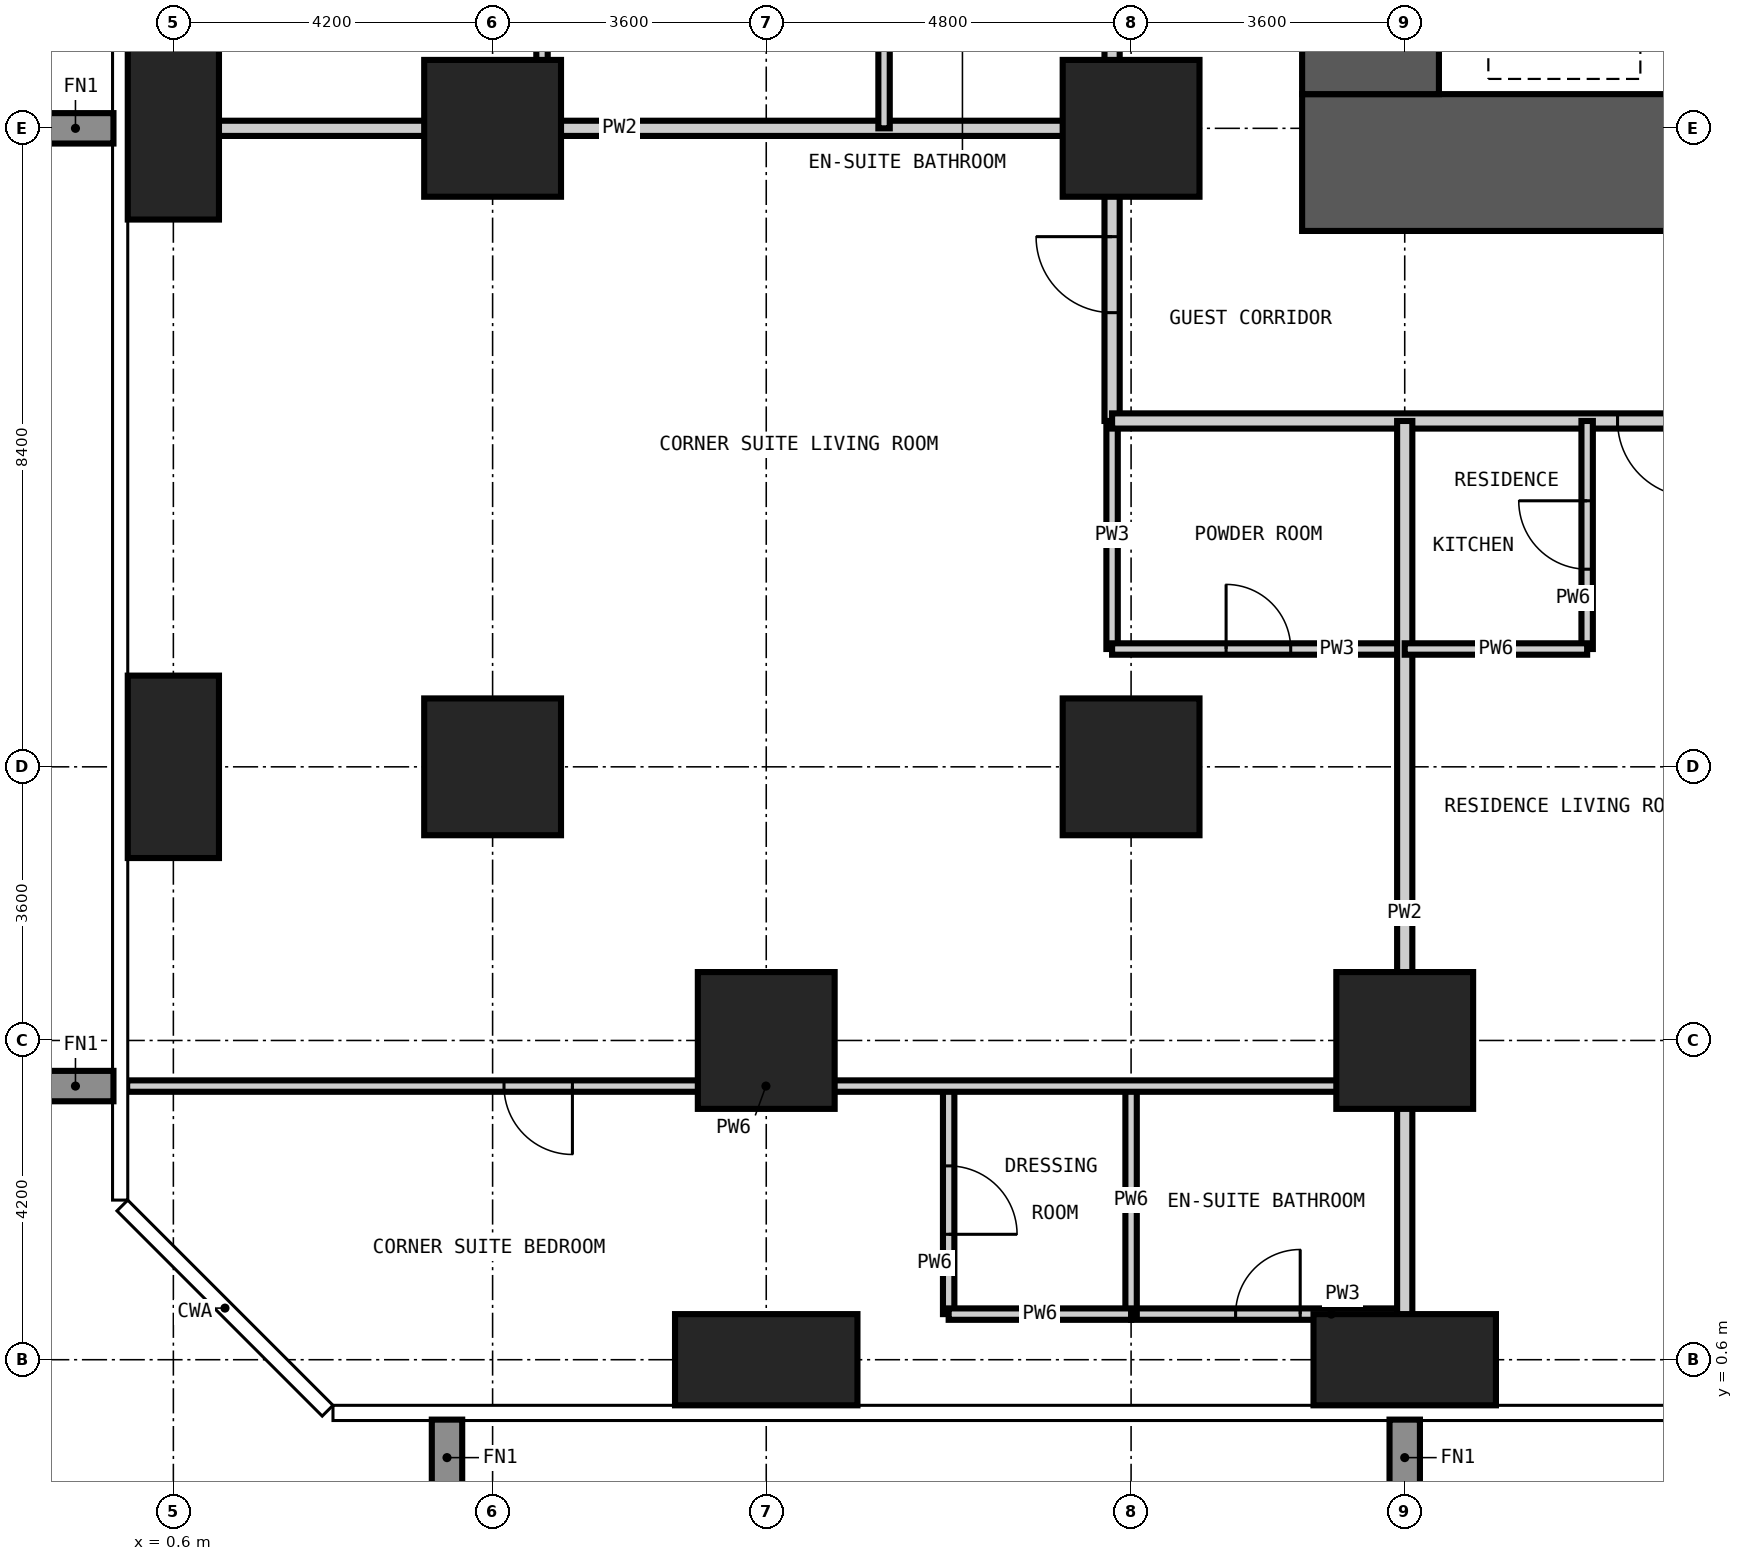
"""IFC4 building model, lengths in metres.
Left out: names, types, materials, properties, quantities, classifications, styles, units other than length and angle.
Written with IfcOpenShell. Run it as: python <this file> out.ifc"""

import sys

from ifc_helpers import new_model, si_unit, direction, frame, frame_2d, origin, origin_2d, place, context, subcontext, project, spatial, rectangle, extrude, element, fill, save


model = new_model("IFC4")
c1 = context("Model", 3, precision=1e-05, world=origin(), true_north=direction((0.0, 1.0)))
c2 = subcontext(c1, "Body", "Model", "MODEL_VIEW")
j1 = project(units=[si_unit("LENGTHUNIT", "METRE"), si_unit("PLANEANGLEUNIT", "RADIAN")], contexts=[c1])
p1 = place(None, origin())
s1 = spatial("IfcSite", under=j1, at=p1, CompositionType="ELEMENT")
p2 = place(p1, origin())
s2 = spatial("IfcBuilding", under=s1, at=p2, CompositionType="ELEMENT")
p3 = place(p2, frame((0.0, 0.0, 45.0)))
s3 = spatial("IfcBuildingStorey", under=s2, at=p3, CompositionType="ELEMENT", Elevation=45.0)
for number, where, z_axis, x_axis in (
    (1, (0.6, 8.4, -0.35), (0.0, 0.0, 1.0), (1.0, 0.0, 0.0)),
    (2, (0.6, 16.8, -0.35), (0.0, 0.0, 1.0), (1.0, 0.0, 0.0)),
):
    element("IfcColumn", number, at=place(p3, frame(where, z_axis=z_axis, x_axis=x_axis)), inside=s3, PredefinedType="COLUMN", context=c2, shape_type="SweptSolid", body=[
        extrude(rectangle(XDim=1.2, YDim=2.4, at=origin_2d()), origin(), (0.0, 0.0, 1.0), 3.6),
    ])
for number, where, z_axis, x_axis in (
    (3, (4.8, 8.4, -0.35), (0.0, 0.0, 1.0), (1.0, 0.0, 0.0)),
    (4, (4.8, 16.8, -0.35), (0.0, 0.0, 1.0), (1.0, 0.0, 0.0)),
):
    element("IfcColumn", number, at=place(p3, frame(where, z_axis=z_axis, x_axis=x_axis)), inside=s3, PredefinedType="COLUMN", context=c2, shape_type="SweptSolid", body=[
        extrude(rectangle(XDim=1.8, YDim=1.8, at=origin_2d()), origin(), (0.0, 0.0, 1.0), 3.6),
    ])
p4 = place(p3, frame((8.4, 0.6, -0.35), z_axis=(0.0, 0.0, 1.0), x_axis=(1.0, 0.0, 0.0)))
e5 = element("IfcColumn", 5, at=p4, inside=s3, PredefinedType="COLUMN", context=c2, shape_type="SweptSolid", body=[
    extrude(rectangle(XDim=2.4, YDim=1.2, at=origin_2d()), origin(), (0.0, 0.0, 1.0), 3.6),
])
for number, where, z_axis, x_axis in (
    (6, (8.4, 4.8, -0.35), (0.0, 0.0, 1.0), (1.0, 0.0, 0.0)),
    (7, (13.2, 8.4, -0.35), (0.0, 0.0, 1.0), (1.0, 0.0, 0.0)),
    (8, (13.2, 16.8, -0.35), (0.0, 0.0, 1.0), (1.0, 0.0, 0.0)),
):
    element("IfcColumn", number, at=place(p3, frame(where, z_axis=z_axis, x_axis=x_axis)), inside=s3, PredefinedType="COLUMN", context=c2, shape_type="SweptSolid", body=[
        extrude(rectangle(XDim=1.8, YDim=1.8, at=origin_2d()), origin(), (0.0, 0.0, 1.0), 3.6),
    ])
p5 = place(p3, frame((16.8, 0.6, -0.35), z_axis=(0.0, 0.0, 1.0), x_axis=(1.0, 0.0, 0.0)))
e9 = element("IfcColumn", 9, at=p5, inside=s3, PredefinedType="COLUMN", context=c2, shape_type="SweptSolid", body=[
    extrude(rectangle(XDim=2.4, YDim=1.2, at=origin_2d()), origin(), (0.0, 0.0, 1.0), 3.6),
])
p6 = place(p3, frame((16.8, 4.8, -0.35), z_axis=(0.0, 0.0, 1.0), x_axis=(1.0, 0.0, 0.0)))
e10 = element("IfcColumn", 10, at=p6, inside=s3, PredefinedType="COLUMN", context=c2, shape_type="SweptSolid", body=[
    extrude(rectangle(XDim=1.8, YDim=1.8, at=origin_2d()), origin(), (0.0, 0.0, 1.0), 3.6),
])
p7 = place(p3, frame((15.45, 16.35, -0.35), z_axis=(0.0, 0.0, 1.0), x_axis=(1.0, 0.0, 0.0)))
e11 = element("IfcWall", 11, at=p7, inside=s3, PredefinedType="SHEAR", context=c2, shape_type="SweptSolid", body=[
    extrude(rectangle(XDim=27.9, YDim=1.8, at=frame_2d((13.95, 0.0))), origin(), (0.0, 0.0, 1.0), 3.6),
])
p8 = place(p7, frame((13.45, 0.0, 0.35)))
e12 = element("IfcOpeningElement", 12, at=p8, cuts=e11, PredefinedType="OPENING", context=c2, shape_type="SweptSolid", body=[
    extrude(rectangle(XDim=1.0, YDim=2.1, at=frame_2d((0.5, 1.05))), frame((0.0, 0.91, 0.0), z_axis=(0.0, -1.0, 0.0), x_axis=(1.0, 0.0, 0.0)), (0.0, 0.0, 1.0), 1.82),
])
p9 = place(p7, frame((19.75, 0.0, 0.35)))
e13 = element("IfcOpeningElement", 13, at=p9, cuts=e11, PredefinedType="OPENING", context=c2, shape_type="SweptSolid", body=[
    extrude(rectangle(XDim=1.0, YDim=2.1, at=frame_2d((0.5, 1.05))), frame((0.0, 0.91, 0.0), z_axis=(0.0, -1.0, 0.0), x_axis=(1.0, 0.0, 0.0)), (0.0, 0.0, 1.0), 1.82),
])
p10 = place(p3, frame((16.35, 41.55, -0.35), z_axis=(0.0, 0.0, 1.0), x_axis=(0.0, -1.0, 0.0)))
e14 = element("IfcWall", 14, at=p10, inside=s3, PredefinedType="SHEAR", context=c2, shape_type="SweptSolid", body=[
    extrude(rectangle(XDim=24.3, YDim=1.8, at=frame_2d((12.15, 0.0))), origin(), (0.0, 0.0, 1.0), 3.6),
])
p11 = place(p10, frame((11.25, 0.0, 0.35)))
e15 = element("IfcOpeningElement", 15, at=p11, cuts=e14, PredefinedType="OPENING", context=c2, shape_type="SweptSolid", body=[
    extrude(rectangle(XDim=1.8, YDim=2.2, at=frame_2d((0.9, 1.1))), frame((0.0, 0.91, 0.0), z_axis=(0.0, -1.0, 0.0), x_axis=(1.0, 0.0, 0.0)), (0.0, 0.0, 1.0), 1.82),
])
p12 = place(p10, frame((20.05, 0.0, 0.35)))
e16 = element("IfcOpeningElement", 16, at=p12, cuts=e14, PredefinedType="OPENING", context=c2, shape_type="SweptSolid", body=[
    extrude(rectangle(XDim=1.0, YDim=2.1, at=frame_2d((0.5, 1.05))), frame((0.0, 0.91, 0.0), z_axis=(0.0, -1.0, 0.0), x_axis=(1.0, 0.0, 0.0)), (0.0, 0.0, 1.0), 1.82),
])
p13 = place(p10, frame((5.35, 0.0, 0.35)))
e17 = element("IfcOpeningElement", 17, at=p13, cuts=e14, PredefinedType="OPENING", context=c2, shape_type="SweptSolid", body=[
    extrude(rectangle(XDim=1.0, YDim=2.1, at=frame_2d((0.5, 1.05))), frame((0.0, 0.91, 0.0), z_axis=(0.0, -1.0, 0.0), x_axis=(1.0, 0.0, 0.0)), (0.0, 0.0, 1.0), 1.82),
])
p14 = place(p3, frame((12.95, 9.95, 0.0), z_axis=(0.0, 0.0, 1.0), x_axis=(0.0, 1.0, 0.0)))
e18 = element("IfcWall", 18, at=p14, inside=s3, PredefinedType="PARTITIONING", context=c2, shape_type="SweptSolid", body=[
    extrude(rectangle(XDim=3.0, YDim=0.15, at=frame_2d((1.5, 0.0))), origin(), (0.0, 0.0, 1.0), 3.25),
])
p15 = place(p3, frame((13.2, 1.2, 0.0), z_axis=(0.0, 0.0, 1.0), x_axis=(1.0, 0.0, 0.0)))
e19 = element("IfcWall", 19, at=p15, inside=s3, PredefinedType="PARTITIONING", context=c2, shape_type="SweptSolid", body=[
    extrude(rectangle(XDim=3.6, YDim=0.15, at=frame_2d((1.8, 0.0))), origin(), (0.0, 0.0, 1.0), 3.25),
])
p16 = place(p15, frame((1.375, 0.0, 0.0)))
e20 = element("IfcOpeningElement", 20, at=p16, cuts=e19, PredefinedType="OPENING", context=c2, shape_type="SweptSolid", body=[
    extrude(rectangle(XDim=0.85, YDim=2.1, at=frame_2d((0.425, 1.05))), frame((0.0, 0.085, 0.0), z_axis=(0.0, -1.0, 0.0), x_axis=(1.0, 0.0, 0.0)), (0.0, 0.0, 1.0), 0.17),
])
p17 = place(p3, frame((12.95, 9.95, 0.0), z_axis=(0.0, 0.0, 1.0), x_axis=(1.0, 0.0, 0.0)))
e21 = element("IfcWall", 21, at=p17, inside=s3, PredefinedType="PARTITIONING", context=c2, shape_type="SweptSolid", body=[
    extrude(rectangle(XDim=3.85, YDim=0.15, at=frame_2d((1.925, 0.0))), origin(), (0.0, 0.0, 1.0), 3.25),
])
p18 = place(p17, frame((1.5, 0.0, 0.0)))
e22 = element("IfcOpeningElement", 22, at=p18, cuts=e21, PredefinedType="OPENING", context=c2, shape_type="SweptSolid", body=[
    extrude(rectangle(XDim=0.85, YDim=2.1, at=frame_2d((0.425, 1.05))), frame((0.0, 0.085, 0.0), z_axis=(0.0, -1.0, 0.0), x_axis=(1.0, 0.0, 0.0)), (0.0, 0.0, 1.0), 0.17),
])
p19 = place(p3, frame((12.95, 12.95, 0.0), z_axis=(0.0, 0.0, 1.0), x_axis=(0.0, 1.0, 0.0)))
e23 = element("IfcWall", 23, at=p19, inside=s3, PredefinedType="PARTITIONING", context=c2, shape_type="SweptSolid", body=[
    extrude(rectangle(XDim=32.6, YDim=0.2, at=frame_2d((16.3, 0.0))), origin(), (0.0, 0.0, 1.0), 3.25),
])
p20 = place(p19, frame((8.45, 0.0, 0.0)))
e24 = element("IfcOpeningElement", 24, at=p20, cuts=e23, PredefinedType="OPENING", context=c2, shape_type="SweptSolid", body=[
    extrude(rectangle(XDim=1.0, YDim=2.2, at=frame_2d((0.5, 1.1))), frame((0.0, 0.11, 0.0), z_axis=(0.0, -1.0, 0.0), x_axis=(1.0, 0.0, 0.0)), (0.0, 0.0, 1.0), 0.22),
])
p21 = place(p19, frame((16.7, 0.0, 0.0)))
e25 = element("IfcOpeningElement", 25, at=p21, cuts=e23, PredefinedType="OPENING", context=c2, shape_type="SweptSolid", body=[
    extrude(rectangle(XDim=1.0, YDim=2.2, at=frame_2d((0.5, 1.1))), frame((0.0, 0.11, 0.0), z_axis=(0.0, -1.0, 0.0), x_axis=(1.0, 0.0, 0.0)), (0.0, 0.0, 1.0), 0.22),
])
p22 = place(p19, frame((23.6, 0.0, 0.0)))
e26 = element("IfcOpeningElement", 26, at=p22, cuts=e23, PredefinedType="OPENING", context=c2, shape_type="SweptSolid", body=[
    extrude(rectangle(XDim=1.0, YDim=2.2, at=frame_2d((0.5, 1.1))), frame((0.0, 0.11, 0.0), z_axis=(0.0, -1.0, 0.0), x_axis=(1.0, 0.0, 0.0)), (0.0, 0.0, 1.0), 0.22),
])
p23 = place(p19, frame((25.1, 0.0, 0.0)))
e27 = element("IfcOpeningElement", 27, at=p23, cuts=e23, PredefinedType="OPENING", context=c2, shape_type="SweptSolid", body=[
    extrude(rectangle(XDim=1.0, YDim=2.2, at=frame_2d((0.5, 1.1))), frame((0.0, 0.11, 0.0), z_axis=(0.0, -1.0, 0.0), x_axis=(1.0, 0.0, 0.0)), (0.0, 0.0, 1.0), 0.22),
])
p24 = place(p19, frame((1.425, 0.0, 0.0)))
e28 = element("IfcOpeningElement", 28, at=p24, cuts=e23, PredefinedType="OPENING", context=c2, shape_type="SweptSolid", body=[
    extrude(rectangle(XDim=1.0, YDim=2.2, at=frame_2d((0.5, 1.1))), frame((0.0, 0.11, 0.0), z_axis=(0.0, -1.0, 0.0), x_axis=(1.0, 0.0, 0.0)), (0.0, 0.0, 1.0), 0.22),
])
p25 = place(p19, frame((30.325, 0.0, 0.0)))
e29 = element("IfcOpeningElement", 29, at=p25, cuts=e23, PredefinedType="OPENING", context=c2, shape_type="SweptSolid", body=[
    extrude(rectangle(XDim=1.0, YDim=2.2, at=frame_2d((0.5, 1.1))), frame((0.0, 0.11, 0.0), z_axis=(0.0, -1.0, 0.0), x_axis=(1.0, 0.0, 0.0)), (0.0, 0.0, 1.0), 0.22),
])
p26 = place(p3, frame((45.25, 12.95, 0.0), z_axis=(0.0, 0.0, 1.0), x_axis=(-1.0, 0.0, 0.0)))
e30 = element("IfcWall", 30, at=p26, inside=s3, PredefinedType="PARTITIONING", context=c2, shape_type="SweptSolid", body=[
    extrude(rectangle(XDim=32.3, YDim=0.2, at=frame_2d((16.15, 0.0))), origin(), (0.0, 0.0, 1.0), 3.25),
])
p27 = place(p26, frame((24.65, 0.0, 0.0)))
e31 = element("IfcOpeningElement", 31, at=p27, cuts=e30, PredefinedType="OPENING", context=c2, shape_type="SweptSolid", body=[
    extrude(rectangle(XDim=1.0, YDim=2.2, at=frame_2d((0.5, 1.1))), frame((0.0, 0.11, 0.0), z_axis=(0.0, -1.0, 0.0), x_axis=(1.0, 0.0, 0.0)), (0.0, 0.0, 1.0), 0.22),
])
p28 = place(p26, frame((16.25, 0.0, 0.0)))
e32 = element("IfcOpeningElement", 32, at=p28, cuts=e30, PredefinedType="OPENING", context=c2, shape_type="SweptSolid", body=[
    extrude(rectangle(XDim=1.0, YDim=2.2, at=frame_2d((0.5, 1.1))), frame((0.0, 0.11, 0.0), z_axis=(0.0, -1.0, 0.0), x_axis=(1.0, 0.0, 0.0)), (0.0, 0.0, 1.0), 0.22),
])
p29 = place(p26, frame((7.85, 0.0, 0.0)))
e33 = element("IfcOpeningElement", 33, at=p29, cuts=e30, PredefinedType="OPENING", context=c2, shape_type="SweptSolid", body=[
    extrude(rectangle(XDim=1.0, YDim=2.2, at=frame_2d((0.5, 1.1))), frame((0.0, 0.11, 0.0), z_axis=(0.0, -1.0, 0.0), x_axis=(1.0, 0.0, 0.0)), (0.0, 0.0, 1.0), 0.22),
])
for number, where, z_axis, x_axis in (
    (34, (16.8, -0.008, 0.0), (0.0, 0.0, 1.0), (0.0, 1.0, 0.0)),
    (35, (-0.008, 16.8, 0.0), (0.0, 0.0, 1.0), (1.0, 0.0, 0.0)),
):
    element("IfcWall", number, at=place(p3, frame(where, z_axis=z_axis, x_axis=x_axis)), inside=s3, PredefinedType="PARTITIONING", context=c2, shape_type="SweptSolid", body=[
        extrude(rectangle(XDim=12.958, YDim=0.2, at=frame_2d((6.479, 0.0))), origin(), (0.0, 0.0, 1.0), 3.25),
    ])
for number, where, z_axis, x_axis in (
    (36, (5.45, 16.8, 0.0), (0.0, 0.0, 1.0), (0.0, 1.0, 0.0)),
    (37, (9.95, 16.8, 0.0), (0.0, 0.0, 1.0), (0.0, 1.0, 0.0)),
):
    element("IfcWall", number, at=place(p3, frame(where, z_axis=z_axis, x_axis=x_axis)), inside=s3, PredefinedType="PARTITIONING", context=c2, shape_type="SweptSolid", body=[
        extrude(rectangle(XDim=3.0, YDim=0.15, at=frame_2d((1.5, 0.0))), origin(), (0.0, 0.0, 1.0), 3.25),
    ])
p30 = place(p3, frame((10.8, 1.2, 0.0), z_axis=(0.0, 0.0, 1.0), x_axis=(0.0, 1.0, 0.0)))
e38 = element("IfcWall", 38, at=p30, inside=s3, PredefinedType="PARTITIONING", context=c2, shape_type="SweptSolid", body=[
    extrude(rectangle(XDim=3.0, YDim=0.15, at=frame_2d((1.5, 0.0))), origin(), (0.0, 0.0, 1.0), 3.25),
])
p31 = place(p30, frame((1.05, 0.0, 0.0)))
e39 = element("IfcOpeningElement", 39, at=p31, cuts=e38, PredefinedType="OPENING", context=c2, shape_type="SweptSolid", body=[
    extrude(rectangle(XDim=0.9, YDim=2.1, at=frame_2d((0.45, 1.05))), frame((0.0, 0.085, 0.0), z_axis=(0.0, -1.0, 0.0), x_axis=(1.0, 0.0, 0.0)), (0.0, 0.0, 1.0), 0.17),
])
p32 = place(p3, frame((13.2, 1.2, 0.0), z_axis=(0.0, 0.0, 1.0), x_axis=(0.0, 1.0, 0.0)))
e40 = element("IfcWall", 40, at=p32, inside=s3, PredefinedType="PARTITIONING", context=c2, shape_type="SweptSolid", body=[
    extrude(rectangle(XDim=3.0, YDim=0.15, at=frame_2d((1.5, 0.0))), origin(), (0.0, 0.0, 1.0), 3.25),
])
p33 = place(p3, frame((19.2, 9.95, 0.0), z_axis=(0.0, 0.0, 1.0), x_axis=(0.0, 1.0, 0.0)))
e41 = element("IfcWall", 41, at=p33, inside=s3, PredefinedType="PARTITIONING", context=c2, shape_type="SweptSolid", body=[
    extrude(rectangle(XDim=3.0, YDim=0.15, at=frame_2d((1.5, 0.0))), origin(), (0.0, 0.0, 1.0), 3.25),
])
p34 = place(p33, frame((1.05, 0.0, 0.0)))
e42 = element("IfcOpeningElement", 42, at=p34, cuts=e41, PredefinedType="OPENING", context=c2, shape_type="SweptSolid", body=[
    extrude(rectangle(XDim=0.9, YDim=2.1, at=frame_2d((0.45, 1.05))), frame((0.0, 0.085, 0.0), z_axis=(0.0, -1.0, 0.0), x_axis=(1.0, 0.0, 0.0)), (0.0, 0.0, 1.0), 0.17),
])
p35 = place(p3, frame((10.8, 1.2, 0.0), z_axis=(0.0, 0.0, 1.0), x_axis=(1.0, 0.0, 0.0)))
e43 = element("IfcWall", 43, at=p35, inside=s3, PredefinedType="PARTITIONING", context=c2, shape_type="SweptSolid", body=[
    extrude(rectangle(XDim=2.4, YDim=0.15, at=frame_2d((1.2, 0.0))), origin(), (0.0, 0.0, 1.0), 3.25),
])
p36 = place(p3, frame((-0.008, 4.2, 0.0), z_axis=(0.0, 0.0, 1.0), x_axis=(1.0, 0.0, 0.0)))
e44 = element("IfcWall", 44, at=p36, inside=s3, PredefinedType="PARTITIONING", context=c2, shape_type="SweptSolid", body=[
    extrude(rectangle(XDim=16.808, YDim=0.15, at=frame_2d((8.404, 0.0))), origin(), (0.0, 0.0, 1.0), 3.25),
])
p37 = place(p36, frame((4.958, 0.0, 0.0)))
e45 = element("IfcOpeningElement", 45, at=p37, cuts=e44, PredefinedType="OPENING", context=c2, shape_type="SweptSolid", body=[
    extrude(rectangle(XDim=0.9, YDim=2.1, at=frame_2d((0.45, 1.05))), frame((0.0, 0.085, 0.0), z_axis=(0.0, -1.0, 0.0), x_axis=(1.0, 0.0, 0.0)), (0.0, 0.0, 1.0), 0.17),
])
p38 = place(p3, frame((16.8, 9.95, 0.0), z_axis=(0.0, 0.0, 1.0), x_axis=(1.0, 0.0, 0.0)))
e46 = element("IfcWall", 46, at=p38, inside=s3, PredefinedType="PARTITIONING", context=c2, shape_type="SweptSolid", body=[
    extrude(rectangle(XDim=2.4, YDim=0.15, at=frame_2d((1.2, 0.0))), origin(), (0.0, 0.0, 1.0), 3.25),
])
p39 = place(p27, origin())
e47 = element("IfcDoor", 47, at=p39, inside=s3, OperationType="SINGLE_SWING_LEFT", PredefinedType="DOOR", context=c2, shape_type="SweptSolid", body=[
    extrude(rectangle(XDim=1.0, YDim=2.2, at=frame_2d((0.5, 1.1))), frame((0.0, 0.025, 0.0), z_axis=(0.0, -1.0, 0.0), x_axis=(1.0, 0.0, 0.0)), (0.0, 0.0, 1.0), 0.05),
])
fill(e31, e47)
p40 = place(p34, origin())
e48 = element("IfcDoor", 48, at=p40, inside=s3, OperationType="SINGLE_SWING_RIGHT", PredefinedType="DOOR", context=c2, shape_type="SweptSolid", body=[
    extrude(rectangle(XDim=0.9, YDim=2.1, at=frame_2d((0.45, 1.05))), frame((0.0, 0.025, 0.0), z_axis=(0.0, -1.0, 0.0), x_axis=(1.0, 0.0, 0.0)), (0.0, 0.0, 1.0), 0.05),
])
fill(e42, e48)
p41 = place(p24, origin())
e49 = element("IfcDoor", 49, at=p41, inside=s3, OperationType="SINGLE_SWING_RIGHT", PredefinedType="DOOR", context=c2, shape_type="SweptSolid", body=[
    extrude(rectangle(XDim=1.0, YDim=2.2, at=frame_2d((0.5, 1.1))), frame((0.0, 0.025, 0.0), z_axis=(0.0, -1.0, 0.0), x_axis=(1.0, 0.0, 0.0)), (0.0, 0.0, 1.0), 0.05),
])
fill(e28, e49)
p42 = place(p18, origin())
e50 = element("IfcDoor", 50, at=p42, inside=s3, OperationType="SINGLE_SWING_LEFT", PredefinedType="DOOR", context=c2, shape_type="SweptSolid", body=[
    extrude(rectangle(XDim=0.85, YDim=2.1, at=frame_2d((0.425, 1.05))), frame((0.0, 0.025, 0.0), z_axis=(0.0, -1.0, 0.0), x_axis=(1.0, 0.0, 0.0)), (0.0, 0.0, 1.0), 0.05),
])
fill(e22, e50)
p43 = place(p37, frame((0.9, 0.0, 0.0), z_axis=(0.0, 0.0, 1.0), x_axis=(-1.0, 0.0, 0.0)))
e51 = element("IfcDoor", 51, at=p43, inside=s3, OperationType="SINGLE_SWING_LEFT", PredefinedType="DOOR", context=c2, shape_type="SweptSolid", body=[
    extrude(rectangle(XDim=0.9, YDim=2.1, at=frame_2d((0.45, 1.05))), frame((0.0, 0.025, 0.0), z_axis=(0.0, -1.0, 0.0), x_axis=(1.0, 0.0, 0.0)), (0.0, 0.0, 1.0), 0.05),
])
fill(e45, e51)
p44 = place(p16, origin())
e52 = element("IfcDoor", 52, at=p44, inside=s3, OperationType="SINGLE_SWING_RIGHT", PredefinedType="DOOR", context=c2, shape_type="SweptSolid", body=[
    extrude(rectangle(XDim=0.85, YDim=2.1, at=frame_2d((0.425, 1.05))), frame((0.0, 0.025, 0.0), z_axis=(0.0, -1.0, 0.0), x_axis=(1.0, 0.0, 0.0)), (0.0, 0.0, 1.0), 0.05),
])
fill(e20, e52)
p45 = place(p31, frame((0.9, 0.0, 0.0), z_axis=(0.0, 0.0, 1.0), x_axis=(-1.0, 0.0, 0.0)))
e53 = element("IfcDoor", 53, at=p45, inside=s3, OperationType="SINGLE_SWING_RIGHT", PredefinedType="DOOR", context=c2, shape_type="SweptSolid", body=[
    extrude(rectangle(XDim=0.9, YDim=2.1, at=frame_2d((0.45, 1.05))), frame((0.0, 0.025, 0.0), z_axis=(0.0, -1.0, 0.0), x_axis=(1.0, 0.0, 0.0)), (0.0, 0.0, 1.0), 0.05),
])
fill(e39, e53)
save(model, sys.argv[1])
